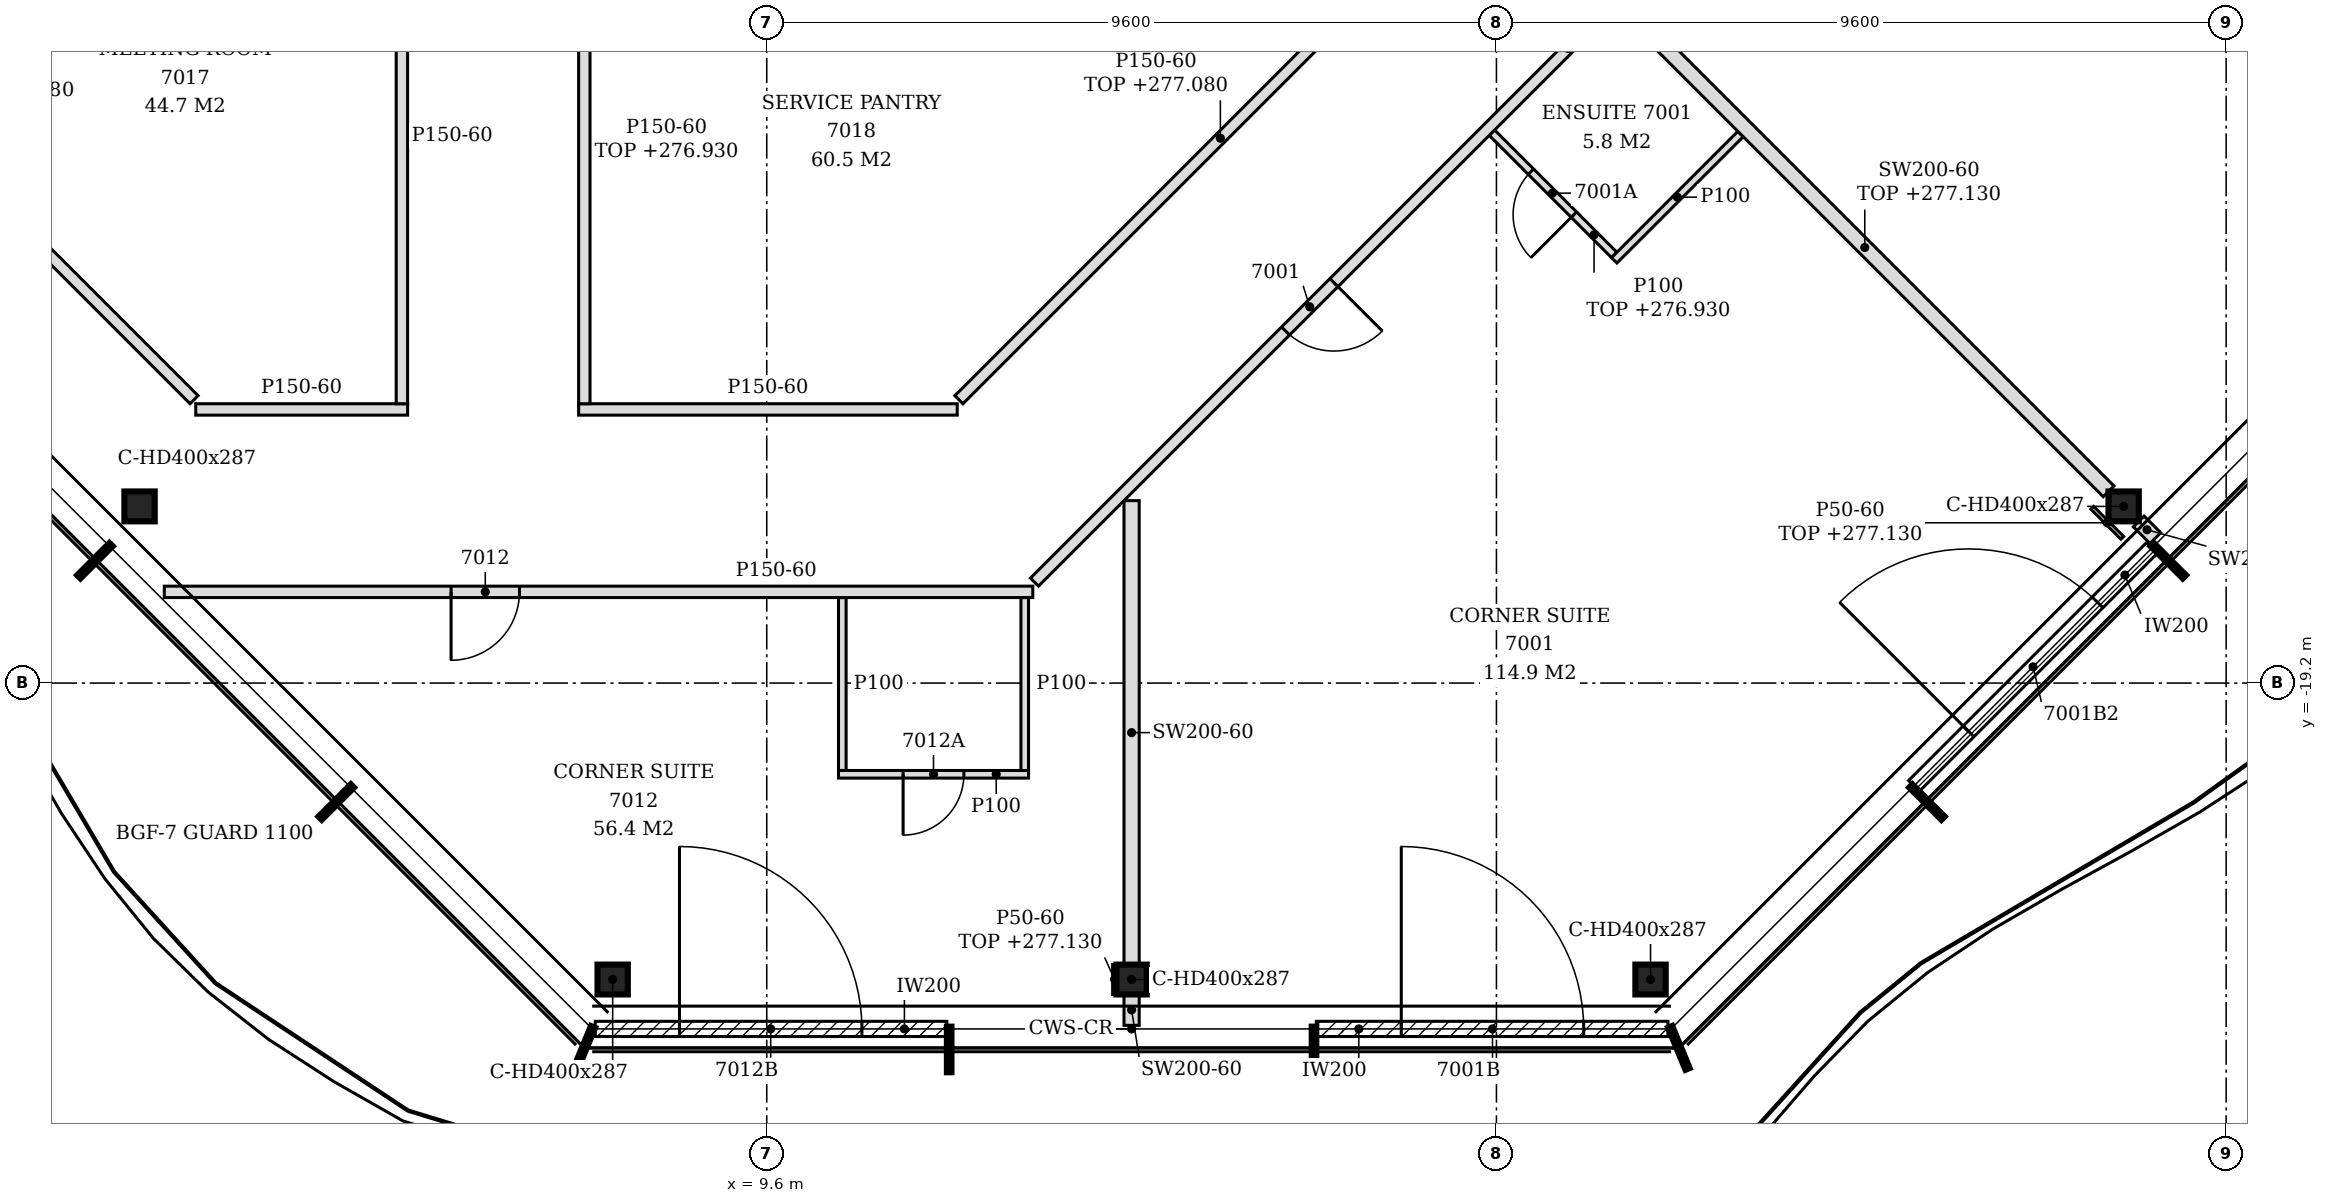
"""IFC4 building model, lengths in metres.
Left out: names, types, materials, properties, quantities, classifications, styles, units other than length and angle.
Written with IfcOpenShell. Run it as: python <this file> out.ifc"""

import sys

from ifc_helpers import new_model, si_unit, direction, frame, frame_2d, origin, origin_2d, place, context, subcontext, project, spatial, polyline, rectangle, i_section, outline, extrude, element, fill, save


model = new_model("IFC4")
c1 = context("Model", 3, precision=1e-05, world=origin(), true_north=direction((0.0, 1.0)))
c2 = subcontext(c1, "Body", "Model", "MODEL_VIEW")
j1 = project(units=[si_unit("LENGTHUNIT", "METRE"), si_unit("PLANEANGLEUNIT", "RADIAN")], contexts=[c1])
p1 = place(None, origin())
s1 = spatial("IfcSite", under=j1, at=p1, CompositionType="ELEMENT")
p2 = place(p1, origin())
s2 = spatial("IfcBuilding", under=s1, at=p2, CompositionType="ELEMENT")
p3 = place(p2, frame((0.0, 0.0, 274.2)))
s3 = spatial("IfcBuildingStorey", under=s2, at=p3, CompositionType="ELEMENT", Elevation=274.2)
for number, where, z_axis, x_axis in (
    (1, (7.573, -23.1, -0.15), (0.0, 0.0, 1.0), (1.0, 0.0, 0.0)),
    (2, (14.4, -23.1, -0.15), (0.0, 0.0, 1.0), (1.0, 0.0, 0.0)),
    (3, (21.227, -23.1, -0.15), (0.0, 0.0, 1.0), (1.0, 0.0, 0.0)),
    (4, (27.451, -16.876, -0.15), (0.0, 0.0, 1.0), (1.0, 0.0, 0.0)),
    (5, (1.348, -16.876, -0.15), (0.0, 0.0, 1.0), (1.0, 0.0, 0.0)),
):
    element("IfcColumn", number, at=place(p3, frame(where, z_axis=z_axis, x_axis=x_axis)), inside=s3, PredefinedType="COLUMN", context=c2, shape_type="SweptSolid", body=[
        extrude(i_section(OverallWidth=0.399, OverallDepth=0.393, WebThickness=0.023, FlangeThickness=0.037, FilletRadius=0.015, at=origin_2d()), origin(), (0.0, 0.0, 1.0), 3.6),
    ])
p4 = place(p3, frame((7.344, -23.75, 0.0), z_axis=(0.0, 0.0, 1.0), x_axis=(1.0, 0.0, 0.0)))
e6 = element("IfcWall", 6, at=p4, inside=s3, PredefinedType="NOTDEFINED", context=c2, shape_type="SweptSolid", body=[
    extrude(rectangle(XDim=4.626, YDim=0.2, at=frame_2d((2.313, 0.0))), origin(), (0.0, 0.0, 1.0), 3.45),
])
p5 = place(p4, frame((1.108, 0.0, 0.0)))
e7 = element("IfcOpeningElement", 7, at=p5, cuts=e6, PredefinedType="OPENING", context=c2, shape_type="SweptSolid", body=[
    extrude(rectangle(XDim=2.4, YDim=2.4, at=frame_2d((1.2, 1.2))), frame((0.0, 0.11, 0.0), z_axis=(0.0, -1.0, 0.0), x_axis=(1.0, 0.0, 0.0)), (0.0, 0.0, 1.0), 0.22),
])
p6 = place(p3, frame((16.83, -23.75, 0.0), z_axis=(0.0, 0.0, 1.0), x_axis=(1.0, 0.0, 0.0)))
e8 = element("IfcWall", 8, at=p6, inside=s3, PredefinedType="NOTDEFINED", context=c2, shape_type="SweptSolid", body=[
    extrude(rectangle(XDim=4.626, YDim=0.2, at=frame_2d((2.313, 0.0))), origin(), (0.0, 0.0, 1.0), 3.45),
])
p7 = place(p6, frame((1.118, 0.0, 0.0)))
e9 = element("IfcOpeningElement", 9, at=p7, cuts=e8, PredefinedType="OPENING", context=c2, shape_type="SweptSolid", body=[
    extrude(rectangle(XDim=2.4, YDim=2.4, at=frame_2d((1.2, 1.2))), frame((0.0, 0.11, 0.0), z_axis=(0.0, -1.0, 0.0), x_axis=(1.0, 0.0, 0.0)), (0.0, 0.0, 1.0), 0.22),
])
p8 = place(p3, frame((24.693, -20.553, 0.0), z_axis=(0.0, 0.0, 1.0), x_axis=(0.707079231393, 0.707134329907, 0.0)))
e10 = element("IfcWall", 10, at=p8, inside=s3, PredefinedType="NOTDEFINED", context=c2, shape_type="SweptSolid", body=[
    extrude(rectangle(XDim=4.431, YDim=0.2, at=frame_2d((2.215, 0.0))), origin(), (0.0, 0.0, 1.0), 3.45),
])
p9 = place(p8, frame((1.015, 0.0, 0.0)))
e11 = element("IfcOpeningElement", 11, at=p9, cuts=e10, PredefinedType="OPENING", context=c2, shape_type="SweptSolid", body=[
    extrude(rectangle(XDim=2.4, YDim=2.4, at=frame_2d((1.2, 1.2))), frame((0.0, 0.11, 0.0), z_axis=(0.0, -1.0, 0.0), x_axis=(1.0, 0.0, 0.0)), (0.0, 0.0, 1.0), 0.22),
])
p10 = place(p3, frame((14.4, -23.703, 0.0), z_axis=(0.0, 0.0, 1.0), x_axis=(0.0, 1.0, 0.0)))
e12 = element("IfcWall", 12, at=p10, inside=s3, PredefinedType="PARTITIONING", context=c2, shape_type="SweptSolid", body=[
    extrude(rectangle(XDim=0.406, YDim=0.2, at=frame_2d((0.203, 0.0))), origin(), (0.0, 0.0, 1.0), 3.45),
])
p11 = place(p3, frame((14.4, -22.904, 0.0), z_axis=(0.0, 0.0, 1.0), x_axis=(0.0, 1.0, 0.0)))
e13 = element("IfcWall", 13, at=p11, inside=s3, PredefinedType="PARTITIONING", context=c2, shape_type="SweptSolid", body=[
    extrude(outline(polyline([(0.0, 0.0), (6.104, 0.0), (6.104, 3.45), (3.809, 3.45), (3.806, 2.88), (3.598, 2.88), (3.596, 3.45), (0.0, 3.45), (0.0, 0.0)])), frame((0.0, 0.1, 0.0), z_axis=(0.0, -1.0, 0.0), x_axis=(1.0, 0.0, 0.0)), (0.0, 0.0, 1.0), 0.2),
])
p12 = place(p3, frame((10.544, -20.4, 0.0), z_axis=(0.0, 0.0, 1.0), x_axis=(1.0, 0.0, 0.0)))
e14 = element("IfcWall", 14, at=p12, inside=s3, PredefinedType="PARTITIONING", context=c2, shape_type="SweptSolid", body=[
    extrude(rectangle(XDim=2.5, YDim=0.1, at=frame_2d((1.25, 0.0))), origin(), (0.0, 0.0, 1.0), 3.45),
])
p13 = place(p12, frame((0.85, 0.0, 0.0)))
e15 = element("IfcOpeningElement", 15, at=p13, cuts=e14, PredefinedType="OPENING", context=c2, shape_type="SweptSolid", body=[
    extrude(rectangle(XDim=0.8, YDim=2.1, at=frame_2d((0.4, 1.05))), frame((0.0, 0.06, 0.0), z_axis=(0.0, -1.0, 0.0), x_axis=(1.0, 0.0, 0.0)), (0.0, 0.0, 1.0), 0.12),
])
for number, where, z_axis, x_axis in (
    (16, (10.594, -20.35, 0.0), (0.0, 0.0, 1.0), (0.0, 1.0, 0.0)),
    (17, (12.994, -20.35, 0.0), (0.0, 0.0, 1.0), (0.0, 1.0, 0.0)),
):
    element("IfcWall", number, at=place(p3, frame(where, z_axis=z_axis, x_axis=x_axis)), inside=s3, PredefinedType="PARTITIONING", context=c2, shape_type="SweptSolid", body=[
        extrude(outline(polyline([(0.0, 0.0), (2.275, 0.0), (2.275, 3.45), (1.255, 3.45), (1.253, 2.88), (1.045, 2.88), (1.043, 3.45), (0.0, 3.45), (0.0, 0.0)])), frame((0.0, 0.05, 0.0), z_axis=(0.0, -1.0, 0.0), x_axis=(1.0, 0.0, 0.0)), (0.0, 0.0, 1.0), 0.1),
    ])
p14 = place(p3, frame((1.674, -18.0, 0.0), z_axis=(0.0, 0.0, 1.0), x_axis=(1.0, 0.0, 0.0)))
e18 = element("IfcWall", 18, at=p14, inside=s3, PredefinedType="PARTITIONING", context=c2, shape_type="SweptSolid", body=[
    extrude(outline(polyline([(0.0, 0.0), (11.426, 0.0), (11.426, 3.45), (5.676, 3.45), (5.674, 2.73), (5.376, 2.73), (5.374, 3.45), (1.086, 3.45), (1.084, 2.93), (0.512, 2.93), (0.51, 3.45), (0.0, 3.45), (0.0, 0.0)])), frame((0.0, 0.075, 0.0), z_axis=(0.0, -1.0, 0.0), x_axis=(1.0, 0.0, 0.0)), (0.0, 0.0, 1.0), 0.15),
])
p15 = place(p14, frame((3.773, 0.0, 0.0)))
e19 = element("IfcOpeningElement", 19, at=p15, cuts=e18, PredefinedType="OPENING", context=c2, shape_type="SweptSolid", body=[
    extrude(rectangle(XDim=0.9, YDim=2.1, at=frame_2d((0.45, 1.05))), frame((0.0, 0.085, 0.0), z_axis=(0.0, -1.0, 0.0), x_axis=(1.0, 0.0, 0.0)), (0.0, 0.0, 1.0), 0.17),
])
p16 = place(p3, frame((13.122, -17.872, 0.0), z_axis=(0.0, 0.0, 1.0), x_axis=(0.707101927234, 0.707111635106, 0.0)))
e20 = element("IfcWall", 20, at=p16, inside=s3, PredefinedType="PARTITIONING", context=c2, shape_type="SweptSolid", body=[
    extrude(rectangle(XDim=25.149, YDim=0.15, at=frame_2d((12.574, 0.0))), origin(), (0.0, 0.0, 1.0), 2.73),
])
p17 = place(p16, frame((4.672, 0.0, 0.0)))
e21 = element("IfcOpeningElement", 21, at=p17, cuts=e20, PredefinedType="OPENING", context=c2, shape_type="SweptSolid", body=[
    extrude(rectangle(XDim=0.9, YDim=2.1, at=frame_2d((0.45, 1.05))), frame((0.0, 0.085, 0.0), z_axis=(0.0, -1.0, 0.0), x_axis=(1.0, 0.0, 0.0)), (0.0, 0.0, 1.0), 0.17),
])
p18 = place(p16, frame((14.284, 0.0, 0.0)))
e22 = element("IfcOpeningElement", 22, at=p18, cuts=e20, PredefinedType="OPENING", context=c2, shape_type="SweptSolid", body=[
    extrude(rectangle(XDim=0.9, YDim=2.1, at=frame_2d((0.45, 1.05))), frame((0.0, 0.085, 0.0), z_axis=(0.0, -1.0, 0.0), x_axis=(1.0, 0.0, 0.0)), (0.0, 0.0, 1.0), 0.17),
])
p19 = place(p16, frame((22.704, 0.0, 0.0)))
e23 = element("IfcOpeningElement", 23, at=p19, cuts=e20, PredefinedType="OPENING", context=c2, shape_type="SweptSolid", body=[
    extrude(rectangle(XDim=0.9, YDim=2.1, at=frame_2d((0.45, 1.05))), frame((0.0, 0.085, 0.0), z_axis=(0.0, -1.0, 0.0), x_axis=(1.0, 0.0, 0.0)), (0.0, 0.0, 1.0), 0.17),
])
p20 = place(p3, frame((27.869, -17.293, 0.0), z_axis=(0.0, 0.0, 1.0), x_axis=(-0.707106781187, 0.707106781187, 0.0)))
e24 = element("IfcWall", 24, at=p20, inside=s3, PredefinedType="PARTITIONING", context=c2, shape_type="SweptSolid", body=[
    extrude(rectangle(XDim=0.31, YDim=0.2, at=frame_2d((0.155, 0.0))), origin(), (0.0, 0.0, 1.0), 3.45),
])
p21 = place(p3, frame((27.254, -16.677, 0.0), z_axis=(0.0, 0.0, 1.0), x_axis=(-0.707120235152, 0.707093326965, 0.0)))
e25 = element("IfcWall", 25, at=p21, inside=s3, PredefinedType="PARTITIONING", context=c2, shape_type="SweptSolid", body=[
    extrude(rectangle(XDim=9.073, YDim=0.2, at=frame_2d((4.537, 0.0))), origin(), (0.0, 0.0, 1.0), 2.93),
])
p22 = place(p3, frame((2.088, -15.6, 0.0), z_axis=(0.0, 0.0, 1.0), x_axis=(1.0, 0.0, 0.0)))
e26 = element("IfcWall", 26, at=p22, inside=s3, PredefinedType="PARTITIONING", context=c2, shape_type="SweptSolid", body=[
    extrude(rectangle(XDim=2.787, YDim=0.15, at=frame_2d((1.394, 0.0))), origin(), (0.0, 0.0, 1.0), 3.45),
])
p23 = place(p3, frame((7.125, -15.6, 0.0), z_axis=(0.0, 0.0, 1.0), x_axis=(1.0, 0.0, 0.0)))
e27 = element("IfcWall", 27, at=p23, inside=s3, PredefinedType="PARTITIONING", context=c2, shape_type="SweptSolid", body=[
    extrude(outline(polyline([(0.0, 0.0), (4.981, 0.0), (4.981, 3.45), (0.225, 3.45), (0.223, 2.73), (0.0, 2.73), (0.0, 0.0)])), frame((0.0, 0.075, 0.0), z_axis=(0.0, -1.0, 0.0), x_axis=(1.0, 0.0, 0.0)), (0.0, 0.0, 1.0), 0.15),
])
p24 = place(p3, frame((2.066, -15.472, 0.0), z_axis=(0.0, 0.0, 1.0), x_axis=(-0.707106781187, 0.707106781187, 0.0)))
e28 = element("IfcWall", 28, at=p24, inside=s3, PredefinedType="PARTITIONING", context=c2, shape_type="SweptSolid", body=[
    extrude(rectangle(XDim=9.529, YDim=0.15, at=frame_2d((4.765, 0.0))), origin(), (0.0, 0.0, 1.0), 2.98),
])
p25 = place(p3, frame((4.8, -15.525, 0.0), z_axis=(0.0, 0.0, 1.0), x_axis=(0.0, 1.0, 0.0)))
e29 = element("IfcWall", 29, at=p25, inside=s3, PredefinedType="PARTITIONING", context=c2, shape_type="SweptSolid", body=[
    extrude(outline(polyline([(0.0, 0.0), (7.05, 0.0), (7.05, 2.83), (6.975, 2.83), (6.973, 3.45), (1.22, 3.45), (1.218, 2.98), (1.03, 2.98), (1.028, 3.45), (0.0, 3.45), (0.0, 0.0)])), frame((0.0, 0.075, 0.0), z_axis=(0.0, -1.0, 0.0), x_axis=(1.0, 0.0, 0.0)), (0.0, 0.0, 1.0), 0.15),
])
p26 = place(p3, frame((7.2, -15.525, 0.0), z_axis=(0.0, 0.0, 1.0), x_axis=(0.0, 1.0, 0.0)))
e30 = element("IfcWall", 30, at=p26, inside=s3, PredefinedType="PARTITIONING", context=c2, shape_type="SweptSolid", body=[
    extrude(rectangle(XDim=6.938, YDim=0.15, at=frame_2d((3.469, 0.0))), origin(), (0.0, 0.0, 1.0), 2.73),
])
p27 = place(p3, frame((12.128, -15.472, 0.0), z_axis=(0.0, 0.0, 1.0), x_axis=(0.70711932755, 0.7070942346, 0.0)))
e31 = element("IfcWall", 31, at=p27, inside=s3, PredefinedType="PARTITIONING", context=c2, shape_type="SweptSolid", body=[
    extrude(rectangle(XDim=9.729, YDim=0.15, at=frame_2d((4.865, 0.0))), origin(), (0.0, 0.0, 1.0), 2.88),
])
p28 = place(p3, frame((20.75, -13.568, 0.0), z_axis=(0.0, 0.0, 1.0), x_axis=(-0.707053116953, 0.707160441348, 0.0)))
e32 = element("IfcWall", 32, at=p28, inside=s3, PredefinedType="PARTITIONING", context=c2, shape_type="SweptSolid", body=[
    extrude(rectangle(XDim=2.275, YDim=0.1, at=frame_2d((1.137, 0.0))), origin(), (0.0, 0.0, 1.0), 2.73),
])
p29 = place(p28, frame((0.75, 0.0, 0.0)))
e33 = element("IfcOpeningElement", 33, at=p29, cuts=e32, PredefinedType="OPENING", context=c2, shape_type="SweptSolid", body=[
    extrude(rectangle(XDim=0.8, YDim=2.1, at=frame_2d((0.4, 1.05))), frame((0.0, 0.06, 0.0), z_axis=(0.0, -1.0, 0.0), x_axis=(1.0, 0.0, 0.0)), (0.0, 0.0, 1.0), 0.12),
])
p30 = place(p3, frame((20.75, -13.638, 0.0), z_axis=(0.0, 0.0, 1.0), x_axis=(0.707158722772, 0.707054835785, 0.0)))
e34 = element("IfcWall", 34, at=p30, inside=s3, PredefinedType="PARTITIONING", context=c2, shape_type="SweptSolid", body=[
    extrude(rectangle(XDim=2.35, YDim=0.1, at=frame_2d((1.175, 0.0))), origin(), (0.0, 0.0, 1.0), 3.45),
])
p31 = place(p3, frame((14.176, -23.296, 0.0), z_axis=(0.0, 0.0, 1.0), x_axis=(0.0, 1.0, 0.0)))
e35 = element("IfcWall", 35, at=p31, inside=s3, PredefinedType="PARTITIONING", context=c2, shape_type="SweptSolid", body=[
    extrude(rectangle(XDim=0.393, YDim=0.05, at=frame_2d((0.196, 0.0))), origin(), (0.0, 0.0, 1.0), 2.93),
])
p32 = place(p3, frame((27.434, -17.289, 0.0), z_axis=(0.0, 0.0, 1.0), x_axis=(-0.707106781187, 0.707106781187, 0.0)))
e36 = element("IfcWall", 36, at=p32, inside=s3, PredefinedType="PARTITIONING", context=c2, shape_type="SweptSolid", body=[
    extrude(rectangle(XDim=0.56, YDim=0.05, at=frame_2d((0.28, 0.0))), origin(), (0.0, 0.0, 1.0), 2.93),
])
p33 = place(p5, origin())
e37 = element("IfcDoor", 37, at=p33, inside=s3, OperationType="SINGLE_SWING_LEFT", PredefinedType="DOOR", context=c2, shape_type="SweptSolid", body=[
    extrude(rectangle(XDim=2.4, YDim=2.4, at=frame_2d((1.2, 1.2))), frame((0.0, 0.025, 0.0), z_axis=(0.0, -1.0, 0.0), x_axis=(1.0, 0.0, 0.0)), (0.0, 0.0, 1.0), 0.05),
])
fill(e7, e37)
p34 = place(p7, origin())
e38 = element("IfcDoor", 38, at=p34, inside=s3, OperationType="SINGLE_SWING_LEFT", PredefinedType="DOOR", context=c2, shape_type="SweptSolid", body=[
    extrude(rectangle(XDim=2.4, YDim=2.4, at=frame_2d((1.2, 1.2))), frame((0.0, 0.025, 0.0), z_axis=(0.0, -1.0, 0.0), x_axis=(1.0, 0.0, 0.0)), (0.0, 0.0, 1.0), 0.05),
])
fill(e9, e38)
p35 = place(p9, origin())
e39 = element("IfcDoor", 39, at=p35, inside=s3, OperationType="SINGLE_SWING_LEFT", PredefinedType="DOOR", context=c2, shape_type="SweptSolid", body=[
    extrude(rectangle(XDim=2.4, YDim=2.4, at=frame_2d((1.2, 1.2))), frame((0.0, 0.025, 0.0), z_axis=(0.0, -1.0, 0.0), x_axis=(1.0, 0.0, 0.0)), (0.0, 0.0, 1.0), 0.05),
])
fill(e11, e39)
p36 = place(p17, frame((0.9, 0.0, 0.0), z_axis=(0.0, 0.0, 1.0), x_axis=(-1.0, 0.0, 0.0)))
e40 = element("IfcDoor", 40, at=p36, inside=s3, OperationType="SINGLE_SWING_LEFT", PredefinedType="DOOR", context=c2, shape_type="SweptSolid", body=[
    extrude(rectangle(XDim=0.9, YDim=2.1, at=frame_2d((0.45, 1.05))), frame((0.0, 0.025, 0.0), z_axis=(0.0, -1.0, 0.0), x_axis=(1.0, 0.0, 0.0)), (0.0, 0.0, 1.0), 0.05),
])
fill(e21, e40)
p37 = place(p29, origin())
e41 = element("IfcDoor", 41, at=p37, inside=s3, OperationType="SINGLE_SWING_LEFT", PredefinedType="DOOR", context=c2, shape_type="SweptSolid", body=[
    extrude(rectangle(XDim=0.8, YDim=2.1, at=frame_2d((0.4, 1.05))), frame((0.0, 0.025, 0.0), z_axis=(0.0, -1.0, 0.0), x_axis=(1.0, 0.0, 0.0)), (0.0, 0.0, 1.0), 0.05),
])
fill(e33, e41)
p38 = place(p15, frame((0.9, 0.0, 0.0), z_axis=(0.0, 0.0, 1.0), x_axis=(-1.0, 0.0, 0.0)))
e42 = element("IfcDoor", 42, at=p38, inside=s3, OperationType="SINGLE_SWING_RIGHT", PredefinedType="DOOR", context=c2, shape_type="SweptSolid", body=[
    extrude(rectangle(XDim=0.9, YDim=2.1, at=frame_2d((0.45, 1.05))), frame((0.0, 0.025, 0.0), z_axis=(0.0, -1.0, 0.0), x_axis=(1.0, 0.0, 0.0)), (0.0, 0.0, 1.0), 0.05),
])
fill(e19, e42)
p39 = place(p13, frame((0.8, 0.0, 0.0), z_axis=(0.0, 0.0, 1.0), x_axis=(-1.0, 0.0, 0.0)))
e43 = element("IfcDoor", 43, at=p39, inside=s3, OperationType="SINGLE_SWING_RIGHT", PredefinedType="DOOR", context=c2, shape_type="SweptSolid", body=[
    extrude(rectangle(XDim=0.8, YDim=2.1, at=frame_2d((0.4, 1.05))), frame((0.0, 0.025, 0.0), z_axis=(0.0, -1.0, 0.0), x_axis=(1.0, 0.0, 0.0)), (0.0, 0.0, 1.0), 0.05),
])
fill(e15, e43)
save(model, sys.argv[1])
